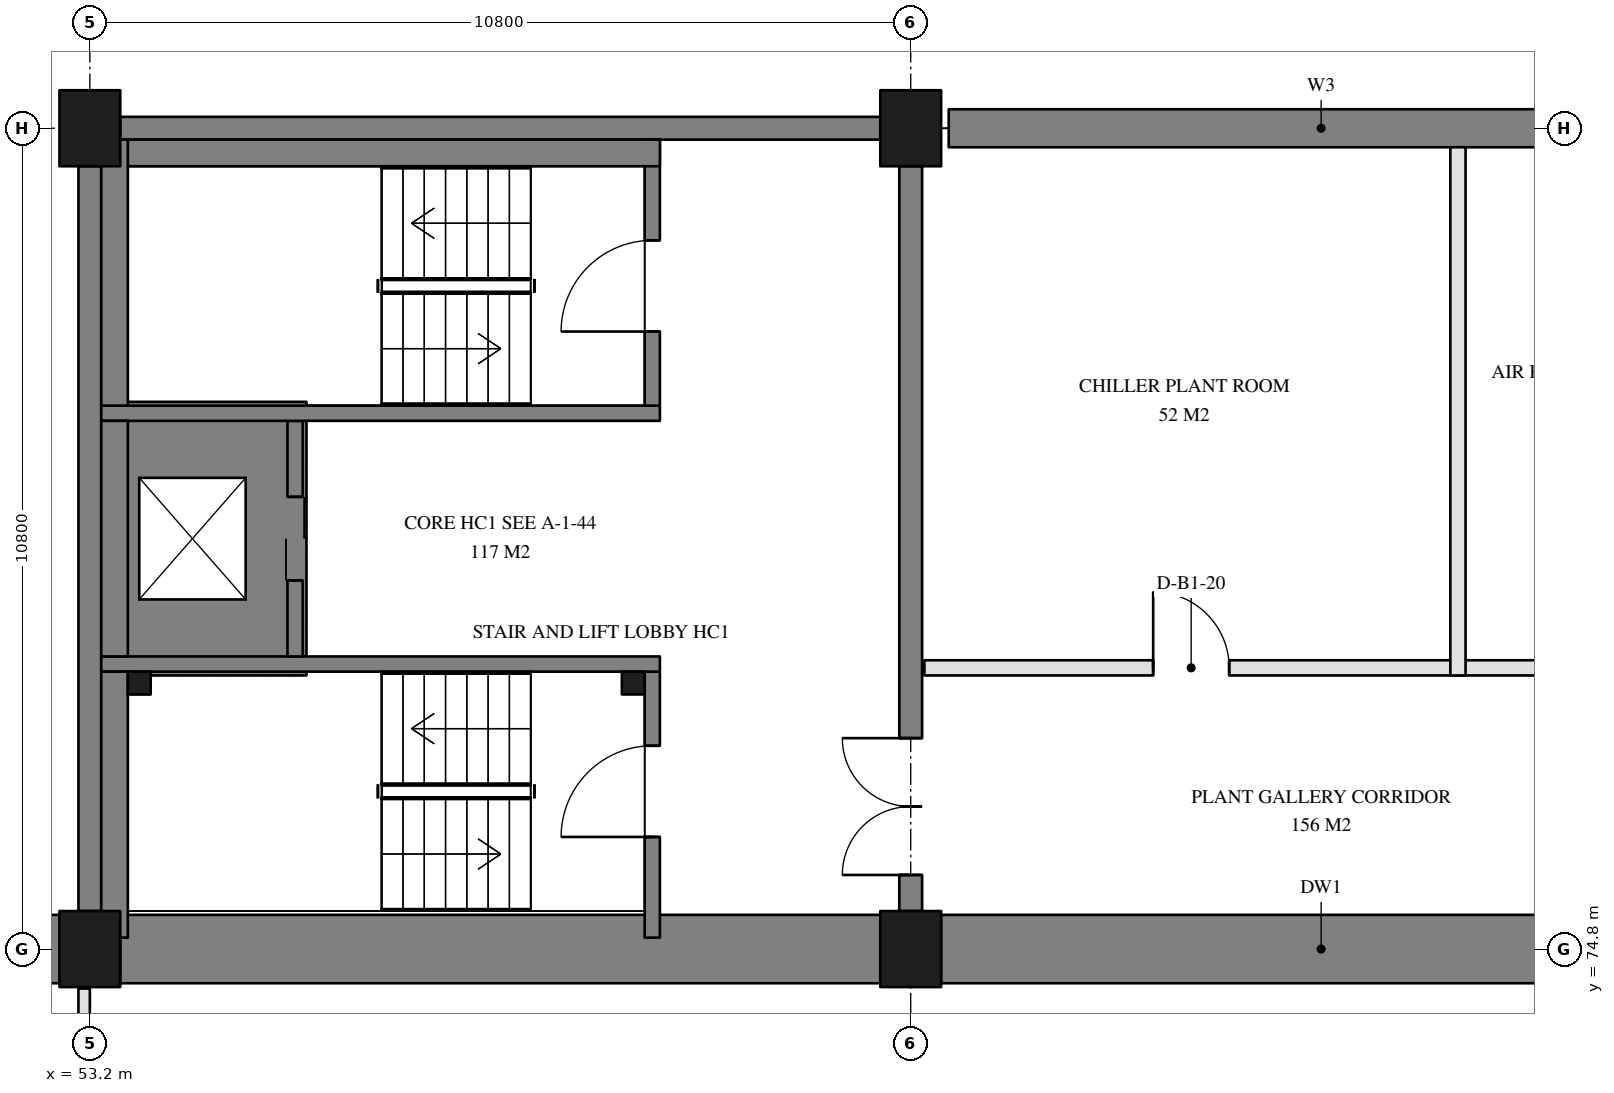
"""IFC4 building model, lengths in metres.
Left out: names, types, materials, properties, quantities, classifications, styles, units other than length and angle.
Written with IfcOpenShell. Run it as: python <this file> out.ifc"""

import sys

from ifc_helpers import new_model, si_unit, direction, frame, frame_2d, origin, origin_2d, place, context, subcontext, project, spatial, polyline, rectangle, outline, extrude, element, fill, save


model = new_model("IFC4")
c1 = context("Model", 3, precision=1e-05, world=origin(), true_north=direction((0.0, 1.0)))
c2 = subcontext(c1, "Body", "Model", "MODEL_VIEW")
j1 = project(units=[si_unit("LENGTHUNIT", "METRE"), si_unit("PLANEANGLEUNIT", "RADIAN")], contexts=[c1])
p1 = place(None, origin())
s1 = spatial("IfcSite", under=j1, at=p1, CompositionType="ELEMENT")
p2 = place(p1, origin())
s2 = spatial("IfcBuilding", under=s1, at=p2, CompositionType="ELEMENT")
p3 = place(p2, frame((0.0, 0.0, -5.4)))
s3 = spatial("IfcBuildingStorey", under=s2, at=p3, CompositionType="ELEMENT", Elevation=-5.4)
p4 = place(p3, frame((53.2, 74.8, 0.0), z_axis=(0.0, 0.0, 1.0), x_axis=(1.0, 0.0, 0.0)))
e1 = element("IfcColumn", 1, at=p4, inside=s3, PredefinedType="COLUMN", context=c2, shape_type="SweptSolid", body=[
    extrude(rectangle(XDim=0.8, YDim=1.0, at=origin_2d()), origin(), (0.0, 0.0, 1.0), 5.4),
])
p5 = place(p3, frame((53.2, 85.6, -0.4), z_axis=(0.0, 0.0, 1.0), x_axis=(1.0, 0.0, 0.0)))
e2 = element("IfcColumn", 2, at=p5, inside=s3, PredefinedType="COLUMN", context=c2, shape_type="SweptSolid", body=[
    extrude(rectangle(XDim=0.8, YDim=1.0, at=origin_2d()), origin(), (0.0, 0.0, 1.0), 5.8),
])
p6 = place(p3, frame((64.0, 74.8, 0.0), z_axis=(0.0, 0.0, 1.0), x_axis=(1.0, 0.0, 0.0)))
e3 = element("IfcColumn", 3, at=p6, inside=s3, PredefinedType="COLUMN", context=c2, shape_type="SweptSolid", body=[
    extrude(rectangle(XDim=0.8, YDim=1.0, at=origin_2d()), origin(), (0.0, 0.0, 1.0), 5.4),
])
p7 = place(p3, frame((64.0, 85.6, -0.4), z_axis=(0.0, 0.0, 1.0), x_axis=(1.0, 0.0, 0.0)))
e4 = element("IfcColumn", 4, at=p7, inside=s3, PredefinedType="COLUMN", context=c2, shape_type="SweptSolid", body=[
    extrude(rectangle(XDim=0.8, YDim=1.0, at=origin_2d()), origin(), (0.0, 0.0, 1.0), 5.8),
])
p8 = place(p3, frame((0.0, 0.0, -1.4)))
e5 = element("IfcWall", 5, at=p8, inside=s3, PredefinedType="SOLIDWALL", context=c2, shape_type="SweptSolid", body=[
    extrude(outline(polyline([(56.05, 78.4), (56.05, 82.0), (53.45, 82.0), (53.45, 78.4), (56.05, 78.4)]), holes=[polyline([(55.8, 81.75), (53.7, 81.75), (53.7, 78.65), (55.8, 78.65), (55.8, 81.75)])]), origin(), (0.0, 0.0, 1.0), 1.4),
])
for number, where, z_axis, x_axis in (
    (6, (74.4, 74.8, 0.0), (0.0, 0.0, 1.0), (-1.0, 0.0, 0.0)),
    (7, (63.6, 74.8, 0.0), (0.0, 0.0, 1.0), (-1.0, 0.0, 0.0)),
):
    element("IfcWall", number, at=place(p3, frame(where, z_axis=z_axis, x_axis=x_axis)), inside=s3, PredefinedType="SOLIDWALL", context=c2, shape_type="SweptSolid", body=[
        extrude(rectangle(XDim=10.0, YDim=0.9, at=frame_2d((5.0, 0.0))), origin(), (0.0, 0.0, 1.0), 4.8),
    ])
p9 = place(p3, frame((52.8, 74.8, 0.0), z_axis=(0.0, 0.0, 1.0), x_axis=(-1.0, 0.0, 0.0)))
e8 = element("IfcWall", 8, at=p9, inside=s3, PredefinedType="SOLIDWALL", context=c2, shape_type="SweptSolid", body=[
    extrude(rectangle(XDim=32.45, YDim=0.9, at=frame_2d((16.225, 0.0))), origin(), (0.0, 0.0, 1.0), 4.8),
])
p10 = place(p3, frame((64.0, 75.3, 0.0), z_axis=(0.0, 0.0, 1.0), x_axis=(0.0, 1.0, 0.0)))
e9 = element("IfcWall", 9, at=p10, inside=s3, PredefinedType="SOLIDWALL", context=c2, shape_type="SweptSolid", body=[
    extrude(rectangle(XDim=9.8, YDim=0.3, at=frame_2d((4.9, 0.0))), origin(), (0.0, 0.0, 1.0), 5.4),
])
p11 = place(p10, frame((0.475, 0.0, 0.0)))
e10 = element("IfcOpeningElement", 10, at=p11, cuts=e9, PredefinedType="OPENING", context=c2, shape_type="SweptSolid", body=[
    extrude(rectangle(XDim=1.8, YDim=2.1, at=frame_2d((0.9, 1.05))), frame((0.0, 0.16, 0.0), z_axis=(0.0, -1.0, 0.0), x_axis=(1.0, 0.0, 0.0)), (0.0, 0.0, 1.0), 0.32),
])
p12 = place(p3, frame((63.6, 85.6, 0.0), z_axis=(0.0, 0.0, 1.0), x_axis=(-1.0, 0.0, 0.0)))
e11 = element("IfcWall", 11, at=p12, inside=s3, PredefinedType="SOLIDWALL", context=c2, shape_type="SweptSolid", body=[
    extrude(rectangle(XDim=10.0, YDim=0.3, at=frame_2d((5.0, 0.0))), origin(), (0.0, 0.0, 1.0), 5.4),
])
p13 = place(p3, frame((53.2, 85.1, 0.0), z_axis=(0.0, 0.0, 1.0), x_axis=(0.0, -1.0, 0.0)))
e12 = element("IfcWall", 12, at=p13, inside=s3, PredefinedType="SOLIDWALL", context=c2, shape_type="SweptSolid", body=[
    extrude(rectangle(XDim=9.8, YDim=0.3, at=frame_2d((4.9, 0.0))), origin(), (0.0, 0.0, 1.0), 5.4),
])
p14 = place(p3, frame((64.5, 85.6, 0.0), z_axis=(0.0, 0.0, 1.0), x_axis=(1.0, 0.0, 0.0)))
e13 = element("IfcWall", 13, at=p14, inside=s3, PredefinedType="SOLIDWALL", context=c2, shape_type="SweptSolid", body=[
    extrude(rectangle(XDim=9.8, YDim=0.5, at=frame_2d((4.9, 0.0))), origin(), (0.0, 0.0, 1.0), 3.9),
])
p15 = place(p3, frame((60.6, 74.95, 0.0), z_axis=(0.0, 0.0, 1.0), x_axis=(0.0, 1.0, 0.0)))
e14 = element("IfcWall", 14, at=p15, inside=s3, PredefinedType="SOLIDWALL", context=c2, shape_type="SweptSolid", body=[
    extrude(rectangle(XDim=3.5, YDim=0.2, at=frame_2d((1.75, 0.0))), origin(), (0.0, 0.0, 1.0), 4.8),
])
p16 = place(p15, frame((1.325, 0.0, 0.0)))
e15 = element("IfcOpeningElement", 15, at=p16, cuts=e14, PredefinedType="OPENING", context=c2, shape_type="SweptSolid", body=[
    extrude(rectangle(XDim=1.2, YDim=2.1, at=frame_2d((0.6, 1.05))), frame((0.0, 0.11, 0.0), z_axis=(0.0, -1.0, 0.0), x_axis=(1.0, 0.0, 0.0)), (0.0, 0.0, 1.0), 0.22),
])
p17 = place(p3, frame((60.7, 78.55, 0.0), z_axis=(0.0, 0.0, 1.0), x_axis=(-1.0, 0.0, 0.0)))
e16 = element("IfcWall", 16, at=p17, inside=s3, PredefinedType="SOLIDWALL", context=c2, shape_type="SweptSolid", body=[
    extrude(rectangle(XDim=7.35, YDim=0.2, at=frame_2d((3.675, 0.0))), origin(), (0.0, 0.0, 1.0), 4.8),
])
p18 = place(p3, frame((55.9, 78.65, 0.0), z_axis=(0.0, 0.0, 1.0), x_axis=(0.0, 1.0, 0.0)))
e17 = element("IfcWall", 17, at=p18, inside=s3, PredefinedType="SOLIDWALL", context=c2, shape_type="SweptSolid", body=[
    extrude(rectangle(XDim=3.1, YDim=0.2, at=frame_2d((1.55, 0.0))), origin(), (0.0, 0.0, 1.0), 4.8),
])
p19 = place(p18, frame((1.0, 0.0, 0.0)))
e18 = element("IfcOpeningElement", 18, at=p19, cuts=e17, PredefinedType="OPENING", context=c2, shape_type="SweptSolid", body=[
    extrude(rectangle(XDim=1.1, YDim=2.1, at=frame_2d((0.55, 1.05))), frame((0.0, 0.11, 0.0), z_axis=(0.0, -1.0, 0.0), x_axis=(1.0, 0.0, 0.0)), (0.0, 0.0, 1.0), 0.22),
])
p20 = place(p3, frame((60.7, 81.85, 0.0), z_axis=(0.0, 0.0, 1.0), x_axis=(-1.0, 0.0, 0.0)))
e19 = element("IfcWall", 19, at=p20, inside=s3, PredefinedType="SOLIDWALL", context=c2, shape_type="SweptSolid", body=[
    extrude(rectangle(XDim=7.35, YDim=0.2, at=frame_2d((3.675, 0.0))), origin(), (0.0, 0.0, 1.0), 4.8),
])
p21 = place(p3, frame((60.6, 81.95, 0.0), z_axis=(0.0, 0.0, 1.0), x_axis=(0.0, 1.0, 0.0)))
e20 = element("IfcWall", 20, at=p21, inside=s3, PredefinedType="SOLIDWALL", context=c2, shape_type="SweptSolid", body=[
    extrude(rectangle(XDim=3.5, YDim=0.2, at=frame_2d((1.75, 0.0))), origin(), (0.0, 0.0, 1.0), 4.8),
])
p22 = place(p21, frame((0.975, 0.0, 0.0)))
e21 = element("IfcOpeningElement", 21, at=p22, cuts=e20, PredefinedType="OPENING", context=c2, shape_type="SweptSolid", body=[
    extrude(rectangle(XDim=1.2, YDim=2.1, at=frame_2d((0.6, 1.05))), frame((0.0, 0.11, 0.0), z_axis=(0.0, -1.0, 0.0), x_axis=(1.0, 0.0, 0.0)), (0.0, 0.0, 1.0), 0.22),
])
p23 = place(p3, frame((53.525, 74.95, 0.0), z_axis=(0.0, 0.0, 1.0), x_axis=(0.0, 1.0, 0.0)))
e22 = element("IfcWall", 22, at=p23, inside=s3, PredefinedType="SOLIDWALL", context=c2, shape_type="SweptSolid", body=[
    extrude(rectangle(XDim=3.5, YDim=0.35, at=frame_2d((1.75, 0.0))), origin(), (0.0, 0.0, 1.0), 4.8),
])
p24 = place(p3, frame((60.7, 85.275, 0.0), z_axis=(0.0, 0.0, 1.0), x_axis=(-1.0, 0.0, 0.0)))
e23 = element("IfcWall", 23, at=p24, inside=s3, PredefinedType="SOLIDWALL", context=c2, shape_type="SweptSolid", body=[
    extrude(rectangle(XDim=7.35, YDim=0.35, at=frame_2d((3.675, 0.0))), origin(), (0.0, 0.0, 1.0), 4.8),
])
p25 = place(p3, frame((53.525, 81.95, 0.0), z_axis=(0.0, 0.0, 1.0), x_axis=(0.0, 1.0, 0.0)))
e24 = element("IfcWall", 24, at=p25, inside=s3, PredefinedType="SOLIDWALL", context=c2, shape_type="SweptSolid", body=[
    extrude(rectangle(XDim=3.5, YDim=0.35, at=frame_2d((1.75, 0.0))), origin(), (0.0, 0.0, 1.0), 4.8),
])
p26 = place(p3, frame((53.525, 78.65, 0.0), z_axis=(0.0, 0.0, 1.0), x_axis=(0.0, 1.0, 0.0)))
e25 = element("IfcWall", 25, at=p26, inside=s3, PredefinedType="SOLIDWALL", context=c2, shape_type="SweptSolid", body=[
    extrude(rectangle(XDim=3.1, YDim=0.35, at=frame_2d((1.55, 0.0))), origin(), (0.0, 0.0, 1.0), 4.8),
])
p27 = place(p3, frame((53.85, 78.3, 0.0), z_axis=(0.0, 0.0, 1.0), x_axis=(1.0, 0.0, 0.0)))
e26 = element("IfcColumn", 26, at=p27, inside=s3, PredefinedType="COLUMN", context=c2, shape_type="SweptSolid", body=[
    extrude(rectangle(XDim=0.3, YDim=0.3, at=origin_2d()), origin(), (0.0, 0.0, 1.0), 3.85),
])
p28 = place(p3, frame((60.35, 78.3, 0.0), z_axis=(0.0, 0.0, 1.0), x_axis=(1.0, 0.0, 0.0)))
e27 = element("IfcColumn", 27, at=p28, inside=s3, PredefinedType="COLUMN", context=c2, shape_type="SweptSolid", body=[
    extrude(rectangle(XDim=0.3, YDim=0.3, at=origin_2d()), origin(), (0.0, 0.0, 1.0), 2.5),
])
p29 = place(p3, frame((53.125, 68.155, 0.0), z_axis=(0.0, 0.0, 1.0), x_axis=(0.0, 1.0, 0.0)))
e28 = element("IfcWall", 28, at=p29, inside=s3, PredefinedType="PARTITIONING", context=c2, shape_type="SweptSolid", body=[
    extrude(rectangle(XDim=6.125, YDim=0.15, at=frame_2d((3.062, 0.0))), origin(), (0.0, 0.0, 1.0), 3.6),
])
p30 = place(p3, frame((71.2, 78.5, 0.0), z_axis=(0.0, 0.0, 1.0), x_axis=(1.0, 0.0, 0.0)))
e29 = element("IfcWall", 29, at=p30, inside=s3, PredefinedType="PARTITIONING", context=c2, shape_type="SweptSolid", body=[
    extrude(rectangle(XDim=7.2, YDim=0.2, at=frame_2d((3.6, 0.0))), origin(), (0.0, 0.0, 1.0), 3.8),
])
p31 = place(p30, frame((3.1, 0.0, 0.0)))
e30 = element("IfcOpeningElement", 30, at=p31, cuts=e29, PredefinedType="OPENING", context=c2, shape_type="SweptSolid", body=[
    extrude(rectangle(XDim=1.0, YDim=2.1, at=frame_2d((0.5, 1.05))), frame((0.0, 0.11, 0.0), z_axis=(0.0, -1.0, 0.0), x_axis=(1.0, 0.0, 0.0)), (0.0, 0.0, 1.0), 0.22),
])
p32 = place(p3, frame((64.18, 78.5, 0.0), z_axis=(0.0, 0.0, 1.0), x_axis=(1.0, 0.0, 0.0)))
e31 = element("IfcWall", 31, at=p32, inside=s3, PredefinedType="PARTITIONING", context=c2, shape_type="SweptSolid", body=[
    extrude(rectangle(XDim=7.02, YDim=0.2, at=frame_2d((3.51, 0.0))), origin(), (0.0, 0.0, 1.0), 4.8),
])
p33 = place(p32, frame((3.01, 0.0, 0.0)))
e32 = element("IfcOpeningElement", 32, at=p33, cuts=e31, PredefinedType="OPENING", context=c2, shape_type="SweptSolid", body=[
    extrude(rectangle(XDim=1.0, YDim=2.1, at=frame_2d((0.5, 1.05))), frame((0.0, 0.11, 0.0), z_axis=(0.0, -1.0, 0.0), x_axis=(1.0, 0.0, 0.0)), (0.0, 0.0, 1.0), 0.22),
])
p34 = place(p3, frame((71.2, 78.4, 0.0), z_axis=(0.0, 0.0, 1.0), x_axis=(0.0, 1.0, 0.0)))
e33 = element("IfcWall", 33, at=p34, inside=s3, PredefinedType="PARTITIONING", context=c2, shape_type="SweptSolid", body=[
    extrude(rectangle(XDim=7.2, YDim=0.2, at=frame_2d((3.6, 0.0))), origin(), (0.0, 0.0, 1.0), 3.9),
])
p35 = place(p19, frame((1.1, 0.0, 0.0), z_axis=(0.0, 0.0, 1.0), x_axis=(-1.0, 0.0, 0.0)))
e34 = element("IfcDoor", 34, at=p35, inside=s3, OperationType="DOUBLE_DOOR_SLIDING", PredefinedType="DOOR", context=c2, shape_type="SweptSolid", body=[
    extrude(rectangle(XDim=1.1, YDim=2.1, at=frame_2d((0.55, 1.05))), frame((0.0, 0.025, 0.0), z_axis=(0.0, -1.0, 0.0), x_axis=(1.0, 0.0, 0.0)), (0.0, 0.0, 1.0), 0.05),
])
fill(e18, e34)
p36 = place(p16, frame((1.2, 0.0, 0.0), z_axis=(0.0, 0.0, 1.0), x_axis=(-1.0, 0.0, 0.0)))
e35 = element("IfcDoor", 35, at=p36, inside=s3, OperationType="SINGLE_SWING_LEFT", PredefinedType="DOOR", context=c2, shape_type="SweptSolid", body=[
    extrude(rectangle(XDim=1.2, YDim=2.1, at=frame_2d((0.6, 1.05))), frame((0.0, 0.025, 0.0), z_axis=(0.0, -1.0, 0.0), x_axis=(1.0, 0.0, 0.0)), (0.0, 0.0, 1.0), 0.05),
])
fill(e15, e35)
p37 = place(p22, frame((1.2, 0.0, 0.0), z_axis=(0.0, 0.0, 1.0), x_axis=(-1.0, 0.0, 0.0)))
e36 = element("IfcDoor", 36, at=p37, inside=s3, OperationType="SINGLE_SWING_RIGHT", PredefinedType="DOOR", context=c2, shape_type="SweptSolid", body=[
    extrude(rectangle(XDim=1.2, YDim=2.1, at=frame_2d((0.6, 1.05))), frame((0.0, 0.025, 0.0), z_axis=(0.0, -1.0, 0.0), x_axis=(1.0, 0.0, 0.0)), (0.0, 0.0, 1.0), 0.05),
])
fill(e21, e36)
p38 = place(p11, frame((1.8, 0.0, 0.0), z_axis=(0.0, 0.0, 1.0), x_axis=(-1.0, 0.0, 0.0)))
e37 = element("IfcDoor", 37, at=p38, inside=s3, OperationType="DOUBLE_DOOR_DOUBLE_SWING", PredefinedType="DOOR", context=c2, shape_type="SweptSolid", body=[
    extrude(rectangle(XDim=1.8, YDim=2.1, at=frame_2d((0.9, 1.05))), frame((0.0, 0.025, 0.0), z_axis=(0.0, -1.0, 0.0), x_axis=(1.0, 0.0, 0.0)), (0.0, 0.0, 1.0), 0.05),
])
fill(e10, e37)
p39 = place(p33, origin())
e38 = element("IfcDoor", 38, at=p39, inside=s3, OperationType="SINGLE_SWING_LEFT", PredefinedType="DOOR", context=c2, shape_type="SweptSolid", body=[
    extrude(rectangle(XDim=1.0, YDim=2.1, at=frame_2d((0.5, 1.05))), frame((0.0, 0.025, 0.0), z_axis=(0.0, -1.0, 0.0), x_axis=(1.0, 0.0, 0.0)), (0.0, 0.0, 1.0), 0.05),
])
fill(e32, e38)
save(model, sys.argv[1])
